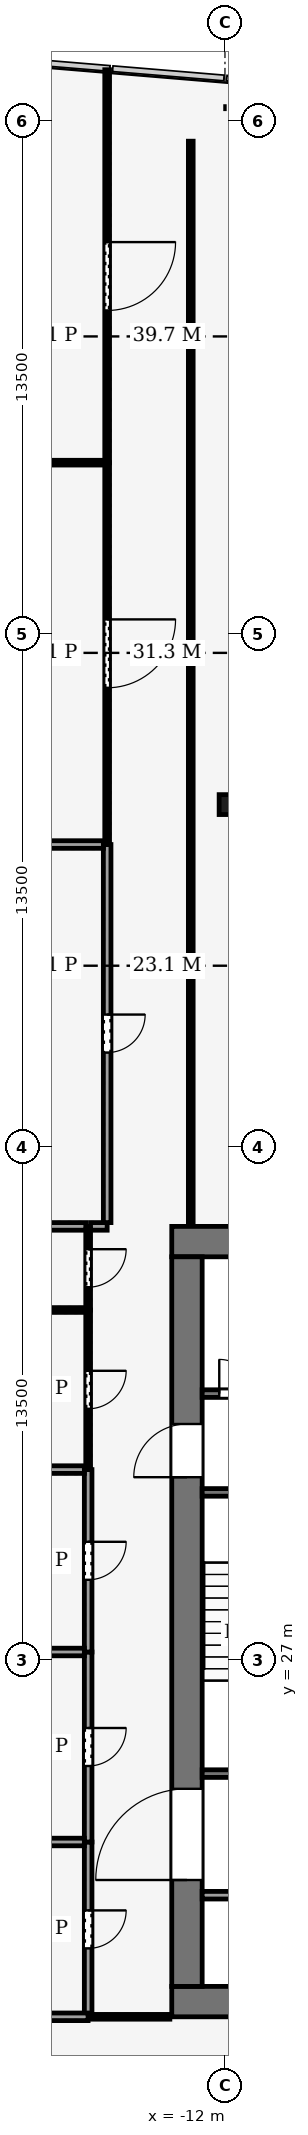
"""IFC4 building model, lengths in metres.
Left out: names, types, materials, properties, quantities, classifications, styles, units other than length and angle.
Written with IfcOpenShell. Run it as: python <this file> out.ifc"""

import sys

from ifc_helpers import new_model, si_unit, direction, frame, frame_2d, origin, origin_2d, place, context, subcontext, project, spatial, rectangle, hollow_rectangle, i_section, extrude, element, fill, save


model = new_model("IFC4")
c1 = context("Model", 3, precision=1e-05, world=origin(), true_north=direction((0.0, 1.0)))
c2 = subcontext(c1, "Body", "Model", "MODEL_VIEW")
j1 = project(units=[si_unit("LENGTHUNIT", "METRE"), si_unit("PLANEANGLEUNIT", "RADIAN")], contexts=[c1])
p1 = place(None, origin())
s1 = spatial("IfcSite", under=j1, at=p1, CompositionType="ELEMENT")
p2 = place(p1, origin())
s2 = spatial("IfcBuilding", under=s1, at=p2, CompositionType="ELEMENT")
p3 = place(p2, frame((0.0, 0.0, 282.0)))
s3 = spatial("IfcBuildingStorey", under=s2, at=p3, CompositionType="ELEMENT", Elevation=282.0)
for number, where, z_axis, x_axis in (
    (1, (-13.4, 18.0, -0.25), (0.0, 0.0, 1.0), (1.0, 0.0, 0.0)),
    (2, (-13.4, 38.0, -0.25), (0.0, 0.0, 1.0), (1.0, 0.0, 0.0)),
):
    element("IfcWall", number, at=place(p3, frame(where, z_axis=z_axis, x_axis=x_axis)), inside=s3, PredefinedType="SHEAR", context=c2, shape_type="SweptSolid", body=[
        extrude(rectangle(XDim=26.8, YDim=0.8, at=frame_2d((13.4, 0.0))), origin(), (0.0, 0.0, 1.0), 7.12),
    ])
p4 = place(p3, frame((-13.0, 18.4, -0.25), z_axis=(0.0, 0.0, 1.0), x_axis=(0.0, 1.0, 0.0)))
e3 = element("IfcWall", 3, at=p4, inside=s3, PredefinedType="SHEAR", context=c2, shape_type="SweptSolid", body=[
    extrude(rectangle(XDim=19.2, YDim=0.8, at=frame_2d((9.6, 0.0))), origin(), (0.0, 0.0, 1.0), 7.12),
])
p5 = place(p4, frame((2.8, 0.0, 0.25)))
e4 = element("IfcOpeningElement", 4, at=p5, cuts=e3, PredefinedType="OPENING", context=c2, shape_type="SweptSolid", body=[
    extrude(rectangle(XDim=2.4, YDim=2.4, at=frame_2d((1.2, 1.2))), frame((0.0, 0.41, 0.0), z_axis=(0.0, -1.0, 0.0), x_axis=(1.0, 0.0, 0.0)), (0.0, 0.0, 1.0), 0.82),
])
p6 = place(p4, frame((13.4, 0.0, 0.25)))
e5 = element("IfcOpeningElement", 5, at=p6, cuts=e3, PredefinedType="OPENING", context=c2, shape_type="SweptSolid", body=[
    extrude(rectangle(XDim=1.4, YDim=2.2, at=frame_2d((0.7, 1.1))), frame((0.0, 0.41, 0.0), z_axis=(0.0, -1.0, 0.0), x_axis=(1.0, 0.0, 0.0)), (0.0, 0.0, 1.0), 0.82),
])
p7 = place(p3, frame((-12.0, 67.75, 0.029), z_axis=(0.0, 0.025979412411, 0.999662478105), x_axis=(-1.0, 0.0, 0.0)))
e6 = element("IfcColumn", 6, at=p7, inside=s3, PredefinedType="COLUMN", context=c2, shape_type="SweptSolid", body=[
    extrude(hollow_rectangle(XDim=0.6, YDim=0.6, WallThickness=0.025, at=origin_2d()), origin(), (0.0, 0.0, 1.0), 6.945),
])
p8 = place(p3, frame((-12.0, 49.5, 0.0), z_axis=(0.0, 0.0, 1.0), x_axis=(1.0, 0.0, 0.0)))
e7 = element("IfcColumn", 7, at=p8, inside=s3, PredefinedType="COLUMN", context=c2, shape_type="SweptSolid", body=[
    extrude(i_section(OverallWidth=0.306, OverallDepth=0.524, WebThickness=0.012, FlangeThickness=0.04, FilletRadius=0.027, at=origin_2d()), origin(), (0.0, 0.0, 1.0), 7.0),
])
p9 = place(p3, frame((-12.6, 20.8, 0.0), z_axis=(0.0, 0.0, 1.0), x_axis=(1.0, 0.0, 0.0)))
e8 = element("IfcWall", 8, at=p9, inside=s3, PredefinedType="PARTITIONING", context=c2, shape_type="SweptSolid", body=[
    extrude(rectangle(XDim=6.6, YDim=0.2, at=frame_2d((3.3, 0.0))), origin(), (0.0, 0.0, 1.0), 6.87),
])
p10 = place(p9, frame((2.8, 0.0, 0.0)))
e9 = element("IfcOpeningElement", 9, at=p10, cuts=e8, PredefinedType="OPENING", context=c2, shape_type="SweptSolid", body=[
    extrude(rectangle(XDim=1.0, YDim=2.1, at=frame_2d((0.5, 1.05))), frame((0.0, 0.11, 0.0), z_axis=(0.0, -1.0, 0.0), x_axis=(1.0, 0.0, 0.0)), (0.0, 0.0, 1.0), 0.22),
])
p11 = place(p3, frame((-12.6, 24.0, 0.0), z_axis=(0.0, 0.0, 1.0), x_axis=(1.0, 0.0, 0.0)))
e10 = element("IfcWall", 10, at=p11, inside=s3, PredefinedType="PARTITIONING", context=c2, shape_type="SweptSolid", body=[
    extrude(rectangle(XDim=6.6, YDim=0.2, at=frame_2d((3.3, 0.0))), origin(), (0.0, 0.0, 1.0), 6.87),
])
p12 = place(p11, frame((4.7, 0.0, 0.0)))
e11 = element("IfcOpeningElement", 11, at=p12, cuts=e10, PredefinedType="OPENING", context=c2, shape_type="SweptSolid", body=[
    extrude(rectangle(XDim=1.0, YDim=2.1, at=frame_2d((0.5, 1.05))), frame((0.0, 0.11, 0.0), z_axis=(0.0, -1.0, 0.0), x_axis=(1.0, 0.0, 0.0)), (0.0, 0.0, 1.0), 0.22),
])
p13 = place(p3, frame((-12.6, 31.4, 0.0), z_axis=(0.0, 0.0, 1.0), x_axis=(1.0, 0.0, 0.0)))
e12 = element("IfcWall", 12, at=p13, inside=s3, PredefinedType="PARTITIONING", context=c2, shape_type="SweptSolid", body=[
    extrude(rectangle(XDim=6.6, YDim=0.2, at=frame_2d((3.3, 0.0))), origin(), (0.0, 0.0, 1.0), 6.87),
])
p14 = place(p13, frame((1.0, 0.0, 0.0)))
e13 = element("IfcOpeningElement", 13, at=p14, cuts=e12, PredefinedType="OPENING", context=c2, shape_type="SweptSolid", body=[
    extrude(rectangle(XDim=1.2, YDim=2.2, at=frame_2d((0.6, 1.1))), frame((0.0, 0.11, 0.0), z_axis=(0.0, -1.0, 0.0), x_axis=(1.0, 0.0, 0.0)), (0.0, 0.0, 1.0), 0.22),
])
p15 = place(p3, frame((-12.6, 34.0, 0.0), z_axis=(0.0, 0.0, 1.0), x_axis=(1.0, 0.0, 0.0)))
e14 = element("IfcWall", 14, at=p15, inside=s3, PredefinedType="PARTITIONING", context=c2, shape_type="SweptSolid", body=[
    extrude(rectangle(XDim=6.6, YDim=0.2, at=frame_2d((3.3, 0.0))), origin(), (0.0, 0.0, 1.0), 6.87),
])
p16 = place(p15, frame((4.7, 0.0, 0.0)))
e15 = element("IfcOpeningElement", 15, at=p16, cuts=e14, PredefinedType="OPENING", context=c2, shape_type="SweptSolid", body=[
    extrude(rectangle(XDim=1.4, YDim=2.2, at=frame_2d((0.7, 1.1))), frame((0.0, 0.11, 0.0), z_axis=(0.0, -1.0, 0.0), x_axis=(1.0, 0.0, 0.0)), (0.0, 0.0, 1.0), 0.22),
])
p17 = place(p15, frame((2.3, 0.0, 0.0)))
e16 = element("IfcOpeningElement", 16, at=p17, cuts=e14, PredefinedType="OPENING", context=c2, shape_type="SweptSolid", body=[
    extrude(rectangle(XDim=1.4, YDim=2.2, at=frame_2d((0.7, 1.1))), frame((0.0, 0.11, 0.0), z_axis=(0.0, -1.0, 0.0), x_axis=(1.0, 0.0, 0.0)), (0.0, 0.0, 1.0), 0.22),
])
p18 = place(p15, frame((0.45, 0.0, 0.0)))
e17 = element("IfcOpeningElement", 17, at=p18, cuts=e14, PredefinedType="OPENING", context=c2, shape_type="SweptSolid", body=[
    extrude(rectangle(XDim=0.9, YDim=2.1, at=frame_2d((0.45, 1.05))), frame((0.0, 0.11, 0.0), z_axis=(0.0, -1.0, 0.0), x_axis=(1.0, 0.0, 0.0)), (0.0, 0.0, 1.0), 0.22),
])
p19 = place(p3, frame((-15.6, 22.2, 0.0), z_axis=(0.0, 0.0, 1.0), x_axis=(0.0, -1.0, 0.0)))
e18 = element("IfcWall", 18, at=p19, inside=s3, PredefinedType="PARTITIONING", context=c2, shape_type="SweptSolid", body=[
    extrude(rectangle(XDim=4.6, YDim=0.2, at=frame_2d((2.3, 0.0))), origin(), (0.0, 0.0, 1.0), 6.14),
])
p20 = place(p19, frame((1.8, 0.0, 0.0)))
e19 = element("IfcOpeningElement", 19, at=p20, cuts=e18, PredefinedType="OPENING", context=c2, shape_type="SweptSolid", body=[
    extrude(rectangle(XDim=1.0, YDim=2.1, at=frame_2d((0.5, 1.05))), frame((0.0, 0.11, 0.0), z_axis=(0.0, -1.0, 0.0), x_axis=(1.0, 0.0, 0.0)), (0.0, 0.0, 1.0), 0.22),
])
p21 = place(p3, frame((-15.6, 27.2, 0.0), z_axis=(0.0, 0.0, 1.0), x_axis=(0.0, -1.0, 0.0)))
e20 = element("IfcWall", 20, at=p21, inside=s3, PredefinedType="PARTITIONING", context=c2, shape_type="SweptSolid", body=[
    extrude(rectangle(XDim=5.0, YDim=0.2, at=frame_2d((2.5, 0.0))), origin(), (0.0, 0.0, 1.0), 6.48),
])
p22 = place(p21, frame((2.0, 0.0, 0.0)))
e21 = element("IfcOpeningElement", 21, at=p22, cuts=e20, PredefinedType="OPENING", context=c2, shape_type="SweptSolid", body=[
    extrude(rectangle(XDim=1.0, YDim=2.1, at=frame_2d((0.5, 1.05))), frame((0.0, 0.11, 0.0), z_axis=(0.0, -1.0, 0.0), x_axis=(1.0, 0.0, 0.0)), (0.0, 0.0, 1.0), 0.22),
])
p23 = place(p3, frame((-15.6, 32.0, 0.0), z_axis=(0.0, 0.0, 1.0), x_axis=(0.0, -1.0, 0.0)))
e22 = element("IfcWall", 22, at=p23, inside=s3, PredefinedType="PARTITIONING", context=c2, shape_type="SweptSolid", body=[
    extrude(rectangle(XDim=4.8, YDim=0.2, at=frame_2d((2.4, 0.0))), origin(), (0.0, 0.0, 1.0), 6.48),
])
p24 = place(p23, frame((1.9, 0.0, 0.0)))
e23 = element("IfcOpeningElement", 23, at=p24, cuts=e22, PredefinedType="OPENING", context=c2, shape_type="SweptSolid", body=[
    extrude(rectangle(XDim=1.0, YDim=2.1, at=frame_2d((0.5, 1.05))), frame((0.0, 0.11, 0.0), z_axis=(0.0, -1.0, 0.0), x_axis=(1.0, 0.0, 0.0)), (0.0, 0.0, 1.0), 0.22),
])
p25 = place(p3, frame((-15.6, 36.2, 0.0), z_axis=(0.0, 0.0, 1.0), x_axis=(0.0, -1.0, 0.0)))
e24 = element("IfcWall", 24, at=p25, inside=s3, PredefinedType="PARTITIONING", context=c2, shape_type="SweptSolid", body=[
    extrude(rectangle(XDim=4.2, YDim=0.125, at=frame_2d((2.1, 0.0))), origin(), (0.0, 0.0, 1.0), 6.48),
])
p26 = place(p25, frame((1.6, 0.0, 0.0)))
e25 = element("IfcOpeningElement", 25, at=p26, cuts=e24, PredefinedType="OPENING", context=c2, shape_type="SweptSolid", body=[
    extrude(rectangle(XDim=1.0, YDim=2.1, at=frame_2d((0.5, 1.05))), frame((0.0, 0.073, 0.0), z_axis=(0.0, -1.0, 0.0), x_axis=(1.0, 0.0, 0.0)), (0.0, 0.0, 1.0), 0.145),
])
p27 = place(p3, frame((-15.6, 38.4, 0.0), z_axis=(0.0, 0.0, 1.0), x_axis=(0.0, -1.0, 0.0)))
e26 = element("IfcWall", 26, at=p27, inside=s3, PredefinedType="PARTITIONING", context=c2, shape_type="SweptSolid", body=[
    extrude(rectangle(XDim=2.2, YDim=0.125, at=frame_2d((1.1, 0.0))), origin(), (0.0, 0.0, 1.0), 6.14),
])
p28 = place(p27, frame((0.6, 0.0, 0.0)))
e27 = element("IfcOpeningElement", 27, at=p28, cuts=e26, PredefinedType="OPENING", context=c2, shape_type="SweptSolid", body=[
    extrude(rectangle(XDim=1.0, YDim=2.1, at=frame_2d((0.5, 1.05))), frame((0.0, 0.073, 0.0), z_axis=(0.0, -1.0, 0.0), x_axis=(1.0, 0.0, 0.0)), (0.0, 0.0, 1.0), 0.145),
])
p29 = place(p3, frame((-15.538, 38.4, 0.0), z_axis=(0.0, 0.0, 1.0), x_axis=(1.0, 0.0, 0.0)))
e28 = element("IfcWall", 28, at=p29, inside=s3, PredefinedType="PARTITIONING", context=c2, shape_type="SweptSolid", body=[
    extrude(rectangle(XDim=0.438, YDim=0.2, at=frame_2d((0.219, 0.0))), origin(), (0.0, 0.0, 1.0), 6.14),
])
p30 = place(p3, frame((-15.1, 48.449, 0.0), z_axis=(0.0, 0.0, 1.0), x_axis=(0.0, -1.0, 0.0)))
e29 = element("IfcWall", 29, at=p30, inside=s3, PredefinedType="PARTITIONING", context=c2, shape_type="SweptSolid", body=[
    extrude(rectangle(XDim=9.949, YDim=0.2, at=frame_2d((4.975, 0.0))), origin(), (0.0, 0.0, 1.0), 6.14),
])
p31 = place(p30, frame((4.475, 0.0, 0.0)))
e30 = element("IfcOpeningElement", 30, at=p31, cuts=e29, PredefinedType="OPENING", context=c2, shape_type="SweptSolid", body=[
    extrude(rectangle(XDim=1.0, YDim=2.1, at=frame_2d((0.5, 1.05))), frame((0.0, 0.11, 0.0), z_axis=(0.0, -1.0, 0.0), x_axis=(1.0, 0.0, 0.0)), (0.0, 0.0, 1.0), 0.22),
])
p32 = place(p3, frame((-15.1, 58.498, 0.0), z_axis=(0.0, 0.0, 1.0), x_axis=(0.0, -1.0, 0.0)))
e31 = element("IfcWall", 31, at=p32, inside=s3, PredefinedType="PARTITIONING", context=c2, shape_type="SweptSolid", body=[
    extrude(rectangle(XDim=10.049, YDim=0.125, at=frame_2d((5.024, 0.0))), origin(), (0.0, 0.0, 1.0), 6.35),
])
p33 = place(p32, frame((4.125, 0.0, 0.0)))
e32 = element("IfcOpeningElement", 32, at=p33, cuts=e31, PredefinedType="OPENING", context=c2, shape_type="SweptSolid", body=[
    extrude(rectangle(XDim=1.8, YDim=2.4, at=frame_2d((0.9, 1.2))), frame((0.0, 0.073, 0.0), z_axis=(0.0, -1.0, 0.0), x_axis=(1.0, 0.0, 0.0)), (0.0, 0.0, 1.0), 0.145),
])
p34 = place(p3, frame((-15.1, 68.838, 0.0), z_axis=(0.0, 0.0, 1.0), x_axis=(0.0, -1.0, 0.0)))
e33 = element("IfcWall", 33, at=p34, inside=s3, PredefinedType="PARTITIONING", context=c2, shape_type="SweptSolid", body=[
    extrude(rectangle(XDim=10.34, YDim=0.125, at=frame_2d((5.17, 0.0))), origin(), (0.0, 0.0, 1.0), 6.04),
])
p35 = place(p34, frame((4.536, 0.0, 0.0)))
e34 = element("IfcOpeningElement", 34, at=p35, cuts=e33, PredefinedType="OPENING", context=c2, shape_type="SweptSolid", body=[
    extrude(rectangle(XDim=1.8, YDim=2.4, at=frame_2d((0.9, 1.2))), frame((0.0, 0.073, 0.0), z_axis=(0.0, -1.0, 0.0), x_axis=(1.0, 0.0, 0.0)), (0.0, 0.0, 1.0), 0.145),
])
for number, where, z_axis, x_axis in (
    (35, (-17.482, 22.2, 0.0), (0.0, 0.0, 1.0), (1.0, 0.0, 0.0)),
    (36, (-17.482, 27.2, 0.0), (0.0, 0.0, 1.0), (1.0, 0.0, 0.0)),
    (37, (-17.482, 32.0, 0.0), (0.0, 0.0, 1.0), (1.0, 0.0, 0.0)),
):
    element("IfcWall", number, at=place(p3, frame(where, z_axis=z_axis, x_axis=x_axis)), inside=s3, PredefinedType="PARTITIONING", context=c2, shape_type="SweptSolid", body=[
        extrude(rectangle(XDim=1.782, YDim=0.2, at=frame_2d((0.891, 0.0))), origin(), (0.0, 0.0, 1.0), 6.87),
    ])
p36 = place(p3, frame((-17.482, 36.2, 0.0), z_axis=(0.0, 0.0, 1.0), x_axis=(1.0, 0.0, 0.0)))
e38 = element("IfcWall", 38, at=p36, inside=s3, PredefinedType="PARTITIONING", context=c2, shape_type="SweptSolid", body=[
    extrude(rectangle(XDim=1.819, YDim=0.125, at=frame_2d((0.91, 0.0))), origin(), (0.0, 0.0, 1.0), 6.87),
])
p37 = place(p3, frame((-17.482, 38.4, 0.0), z_axis=(0.0, 0.0, 1.0), x_axis=(1.0, 0.0, 0.0)))
e39 = element("IfcWall", 39, at=p37, inside=s3, PredefinedType="PARTITIONING", context=c2, shape_type="SweptSolid", body=[
    extrude(rectangle(XDim=1.819, YDim=0.2, at=frame_2d((0.91, 0.0))), origin(), (0.0, 0.0, 1.0), 6.14),
])
p38 = place(p3, frame((-17.482, 48.449, 0.0), z_axis=(0.0, 0.0, 1.0), x_axis=(1.0, 0.0, 0.0)))
e40 = element("IfcWall", 40, at=p38, inside=s3, PredefinedType="PARTITIONING", context=c2, shape_type="SweptSolid", body=[
    extrude(rectangle(XDim=2.282, YDim=0.2, at=frame_2d((1.141, 0.0))), origin(), (0.0, 0.0, 1.0), 6.39),
])
p39 = place(p3, frame((-17.482, 58.498, 0.0), z_axis=(0.0, 0.0, 1.0), x_axis=(1.0, 0.0, 0.0)))
e41 = element("IfcWall", 41, at=p39, inside=s3, PredefinedType="PARTITIONING", context=c2, shape_type="SweptSolid", body=[
    extrude(rectangle(XDim=2.319, YDim=0.125, at=frame_2d((1.16, 0.0))), origin(), (0.0, 0.0, 1.0), 6.24),
])
p40 = place(p3, frame((-13.45, 17.6, 0.0), z_axis=(0.0, 0.0, 1.0), x_axis=(-1.0, 0.0, 0.0)))
e42 = element("IfcWall", 42, at=p40, inside=s3, PredefinedType="PARTITIONING", context=c2, shape_type="SweptSolid", body=[
    extrude(rectangle(XDim=2.148, YDim=0.125, at=frame_2d((1.074, 0.0))), origin(), (0.0, 0.0, 1.0), 6.14),
])
p41 = place(p3, frame((-12.9, 66.958, 0.0), z_axis=(0.0, 0.0, 1.0), x_axis=(0.0, -1.0, 0.0)))
e43 = element("IfcWall", 43, at=p41, inside=s3, PredefinedType="PARTITIONING", context=c2, shape_type="SweptSolid", body=[
    extrude(rectangle(XDim=28.508, YDim=0.125, at=frame_2d((14.254, 0.0))), origin(), (0.0, 0.0, 1.0), 6.35),
])
p42 = place(p3, frame((-15.602, 17.6, 0.0), z_axis=(0.0, 0.0, 1.0), x_axis=(-1.0, 0.0, 0.0)))
e44 = element("IfcWall", 44, at=p42, inside=s3, PredefinedType="PARTITIONING", context=c2, shape_type="SweptSolid", body=[
    extrude(rectangle(XDim=1.88, YDim=0.2, at=frame_2d((0.94, 0.0))), origin(), (0.0, 0.0, 1.0), 6.14),
])
p43 = place(p18, origin())
e45 = element("IfcDoor", 45, at=p43, inside=s3, OperationType="SINGLE_SWING_RIGHT", PredefinedType="DOOR", context=c2, shape_type="SweptSolid", body=[
    extrude(rectangle(XDim=0.9, YDim=2.1, at=frame_2d((0.45, 1.05))), frame((0.0, 0.025, 0.0), z_axis=(0.0, -1.0, 0.0), x_axis=(1.0, 0.0, 0.0)), (0.0, 0.0, 1.0), 0.05),
])
fill(e17, e45)
p44 = place(p5, origin())
e46 = element("IfcDoor", 46, at=p44, inside=s3, OperationType="DOUBLE_DOOR_SINGLE_SWING", PredefinedType="DOOR", context=c2, shape_type="SweptSolid", body=[
    extrude(rectangle(XDim=2.4, YDim=2.4, at=frame_2d((1.2, 1.2))), frame((0.0, 0.025, 0.0), z_axis=(0.0, -1.0, 0.0), x_axis=(1.0, 0.0, 0.0)), (0.0, 0.0, 1.0), 0.05),
])
fill(e4, e46)
p45 = place(p6, origin())
e47 = element("IfcDoor", 47, at=p45, inside=s3, OperationType="SINGLE_SWING_LEFT", PredefinedType="DOOR", context=c2, shape_type="SweptSolid", body=[
    extrude(rectangle(XDim=1.4, YDim=2.2, at=frame_2d((0.7, 1.1))), frame((0.0, 0.025, 0.0), z_axis=(0.0, -1.0, 0.0), x_axis=(1.0, 0.0, 0.0)), (0.0, 0.0, 1.0), 0.05),
])
fill(e5, e47)
p46 = place(p20, origin())
e48 = element("IfcDoor", 48, at=p46, inside=s3, OperationType="SINGLE_SWING_LEFT", PredefinedType="DOOR", context=c2, shape_type="SweptSolid", body=[
    extrude(rectangle(XDim=1.0, YDim=2.1, at=frame_2d((0.5, 1.05))), frame((0.0, 0.025, 0.0), z_axis=(0.0, -1.0, 0.0), x_axis=(1.0, 0.0, 0.0)), (0.0, 0.0, 1.0), 0.05),
])
fill(e19, e48)
p47 = place(p22, origin())
e49 = element("IfcDoor", 49, at=p47, inside=s3, OperationType="SINGLE_SWING_RIGHT", PredefinedType="DOOR", context=c2, shape_type="SweptSolid", body=[
    extrude(rectangle(XDim=1.0, YDim=2.1, at=frame_2d((0.5, 1.05))), frame((0.0, 0.025, 0.0), z_axis=(0.0, -1.0, 0.0), x_axis=(1.0, 0.0, 0.0)), (0.0, 0.0, 1.0), 0.05),
])
fill(e21, e49)
p48 = place(p24, origin())
e50 = element("IfcDoor", 50, at=p48, inside=s3, OperationType="SINGLE_SWING_LEFT", PredefinedType="DOOR", context=c2, shape_type="SweptSolid", body=[
    extrude(rectangle(XDim=1.0, YDim=2.1, at=frame_2d((0.5, 1.05))), frame((0.0, 0.025, 0.0), z_axis=(0.0, -1.0, 0.0), x_axis=(1.0, 0.0, 0.0)), (0.0, 0.0, 1.0), 0.05),
])
fill(e23, e50)
p49 = place(p26, origin())
e51 = element("IfcDoor", 51, at=p49, inside=s3, OperationType="SINGLE_SWING_RIGHT", PredefinedType="DOOR", context=c2, shape_type="SweptSolid", body=[
    extrude(rectangle(XDim=1.0, YDim=2.1, at=frame_2d((0.5, 1.05))), frame((0.0, 0.025, 0.0), z_axis=(0.0, -1.0, 0.0), x_axis=(1.0, 0.0, 0.0)), (0.0, 0.0, 1.0), 0.05),
])
fill(e25, e51)
p50 = place(p28, origin())
e52 = element("IfcDoor", 52, at=p50, inside=s3, OperationType="SINGLE_SWING_LEFT", PredefinedType="DOOR", context=c2, shape_type="SweptSolid", body=[
    extrude(rectangle(XDim=1.0, YDim=2.1, at=frame_2d((0.5, 1.05))), frame((0.0, 0.025, 0.0), z_axis=(0.0, -1.0, 0.0), x_axis=(1.0, 0.0, 0.0)), (0.0, 0.0, 1.0), 0.05),
])
fill(e27, e52)
p51 = place(p31, origin())
e53 = element("IfcDoor", 53, at=p51, inside=s3, OperationType="SINGLE_SWING_RIGHT", PredefinedType="DOOR", context=c2, shape_type="SweptSolid", body=[
    extrude(rectangle(XDim=1.0, YDim=2.1, at=frame_2d((0.5, 1.05))), frame((0.0, 0.025, 0.0), z_axis=(0.0, -1.0, 0.0), x_axis=(1.0, 0.0, 0.0)), (0.0, 0.0, 1.0), 0.05),
])
fill(e30, e53)
p52 = place(p33, origin())
e54 = element("IfcDoor", 54, at=p52, inside=s3, OperationType="DOUBLE_DOOR_SINGLE_SWING", PredefinedType="DOOR", context=c2, shape_type="SweptSolid", body=[
    extrude(rectangle(XDim=1.8, YDim=2.4, at=frame_2d((0.9, 1.2))), frame((0.0, 0.025, 0.0), z_axis=(0.0, -1.0, 0.0), x_axis=(1.0, 0.0, 0.0)), (0.0, 0.0, 1.0), 0.05),
])
fill(e32, e54)
p53 = place(p35, origin())
e55 = element("IfcDoor", 55, at=p53, inside=s3, OperationType="DOUBLE_DOOR_SINGLE_SWING", PredefinedType="DOOR", context=c2, shape_type="SweptSolid", body=[
    extrude(rectangle(XDim=1.8, YDim=2.4, at=frame_2d((0.9, 1.2))), frame((0.0, 0.025, 0.0), z_axis=(0.0, -1.0, 0.0), x_axis=(1.0, 0.0, 0.0)), (0.0, 0.0, 1.0), 0.05),
])
fill(e34, e55)
save(model, sys.argv[1])
